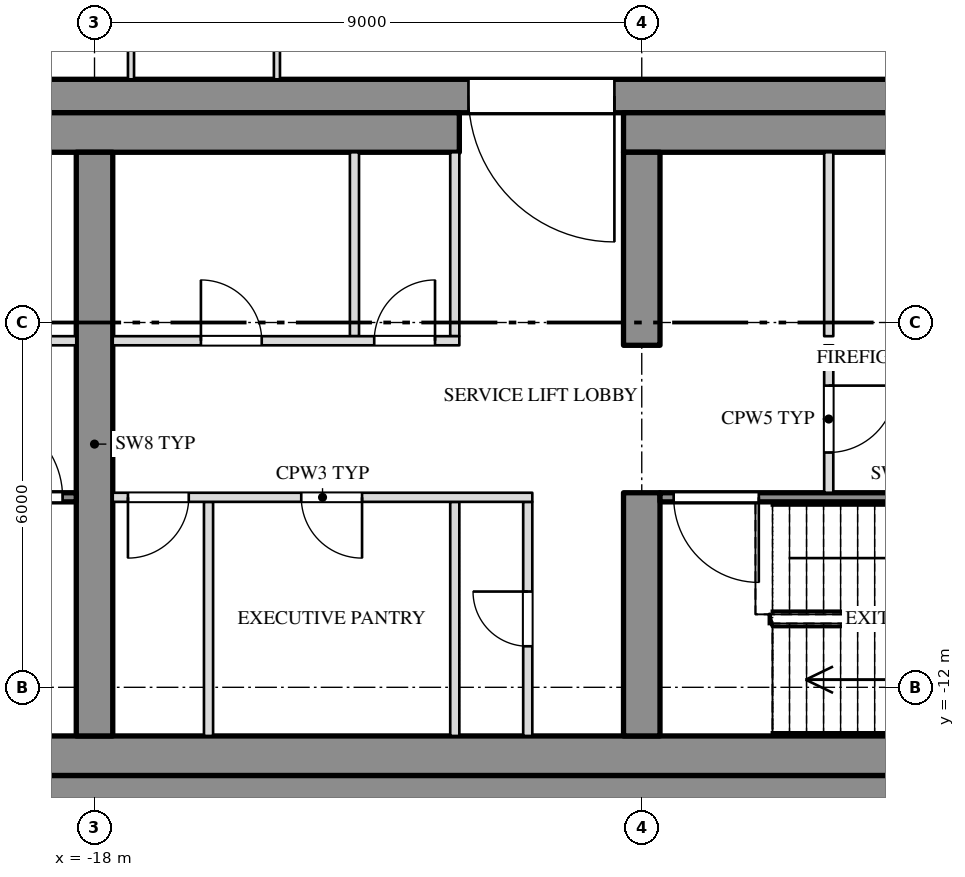
"""IFC4 building model, lengths in metres.
Left out: names, types, materials, properties, quantities, classifications, styles, units other than length and angle.
Written with IfcOpenShell. Run it as: python <this file> out.ifc"""

import sys

from ifc_helpers import new_model, si_unit, direction, frame, frame_2d, origin, place, context, subcontext, project, spatial, rectangle, extrude, element, fill, save


model = new_model("IFC4")
c1 = context("Model", 3, precision=1e-05, world=origin(), true_north=direction((0.0, 1.0)))
c2 = subcontext(c1, "Body", "Model", "MODEL_VIEW")
j1 = project(units=[si_unit("LENGTHUNIT", "METRE"), si_unit("PLANEANGLEUNIT", "RADIAN")], contexts=[c1])
p1 = place(None, origin())
s1 = spatial("IfcSite", under=j1, at=p1, CompositionType="ELEMENT")
p2 = place(p1, origin())
s2 = spatial("IfcBuilding", under=s1, at=p2, CompositionType="ELEMENT")
p3 = place(p2, frame((0.0, 0.0, 280.5)))
s3 = spatial("IfcBuildingStorey", under=s2, at=p3, CompositionType="ELEMENT", Elevation=280.5)
p4 = place(p3, frame((-27.0, -2.275, 0.0), z_axis=(0.0, 0.0, 1.0), x_axis=(1.0, 0.0, 0.0)))
e1 = element("IfcWall", 1, at=p4, inside=s3, PredefinedType="SHEAR", context=c2, shape_type="SweptSolid", body=[
    extrude(rectangle(XDim=54.0, YDim=0.55, at=frame_2d((27.0, 0.0))), origin(), (0.0, 0.0, 1.0), 3.78),
])
p5 = place(p4, frame((15.15, 0.0, 0.0)))
e2 = element("IfcOpeningElement", 2, at=p5, cuts=e1, PredefinedType="OPENING", context=c2, shape_type="SweptSolid", body=[
    extrude(rectangle(XDim=2.4, YDim=2.1, at=frame_2d((1.2, 1.05))), frame((0.0, 0.287, 0.0), z_axis=(0.0, -1.0, 0.0), x_axis=(1.0, 0.0, 0.0)), (0.0, 0.0, 1.0), 0.574),
])
p6 = place(p4, frame((36.45, 0.0, 0.0)))
e3 = element("IfcOpeningElement", 3, at=p6, cuts=e1, PredefinedType="OPENING", context=c2, shape_type="SweptSolid", body=[
    extrude(rectangle(XDim=2.4, YDim=2.1, at=frame_2d((1.2, 1.05))), frame((0.0, 0.287, 0.0), z_axis=(0.0, -1.0, 0.0), x_axis=(1.0, 0.0, 0.0)), (0.0, 0.0, 1.0), 0.574),
])
p7 = place(p3, frame((-27.0, -13.725, 0.0), z_axis=(0.0, 0.0, 1.0), x_axis=(1.0, 0.0, 0.0)))
e4 = element("IfcWall", 4, at=p7, inside=s3, PredefinedType="SHEAR", context=c2, shape_type="SweptSolid", body=[
    extrude(rectangle(XDim=54.0, YDim=0.55, at=frame_2d((27.0, 0.0))), origin(), (0.0, 0.0, 1.0), 3.78),
])
p8 = place(p3, frame((-26.45, -2.875, 0.0), z_axis=(0.0, 0.0, 1.0), x_axis=(1.0, 0.0, 0.0)))
e5 = element("IfcWall", 5, at=p8, inside=s3, PredefinedType="SHEAR", context=c2, shape_type="SweptSolid", body=[
    extrude(rectangle(XDim=14.45, YDim=0.65, at=frame_2d((7.225, 0.0))), origin(), (0.0, 0.0, 1.0), 3.78),
])
p9 = place(p3, frame((-9.3, -2.875, 0.0), z_axis=(0.0, 0.0, 1.0), x_axis=(1.0, 0.0, 0.0)))
e6 = element("IfcWall", 6, at=p9, inside=s3, PredefinedType="SHEAR", context=c2, shape_type="SweptSolid", body=[
    extrude(rectangle(XDim=18.6, YDim=0.65, at=frame_2d((9.3, 0.0))), origin(), (0.0, 0.0, 1.0), 3.78),
])
p10 = place(p3, frame((-26.45, -13.125, 0.0), z_axis=(0.0, 0.0, 1.0), x_axis=(1.0, 0.0, 0.0)))
e7 = element("IfcWall", 7, at=p10, inside=s3, PredefinedType="SHEAR", context=c2, shape_type="SweptSolid", body=[
    extrude(rectangle(XDim=52.9, YDim=0.65, at=frame_2d((26.45, 0.0))), origin(), (0.0, 0.0, 1.0), 3.78),
])
p11 = place(p3, frame((-18.0, -12.8, 0.0), z_axis=(0.0, 0.0, 1.0), x_axis=(0.0, 1.0, 0.0)))
e8 = element("IfcWall", 8, at=p11, inside=s3, PredefinedType="SHEAR", context=c2, shape_type="SweptSolid", body=[
    extrude(rectangle(XDim=9.6, YDim=0.6, at=frame_2d((4.8, 0.0))), origin(), (0.0, 0.0, 1.0), 3.78),
])
p12 = place(p3, frame((-9.0, -12.8, 0.0), z_axis=(0.0, 0.0, 1.0), x_axis=(0.0, 1.0, 0.0)))
e9 = element("IfcWall", 9, at=p12, inside=s3, PredefinedType="SHEAR", context=c2, shape_type="SweptSolid", body=[
    extrude(rectangle(XDim=4.0, YDim=0.6, at=frame_2d((2.0, 0.0))), origin(), (0.0, 0.0, 1.0), 3.78),
])
p13 = place(p3, frame((-9.0, -6.375, 0.0), z_axis=(0.0, 0.0, 1.0), x_axis=(0.0, 1.0, 0.0)))
e10 = element("IfcWall", 10, at=p13, inside=s3, PredefinedType="SHEAR", context=c2, shape_type="SweptSolid", body=[
    extrude(rectangle(XDim=3.175, YDim=0.6, at=frame_2d((1.587, 0.0))), origin(), (0.0, 0.0, 1.0), 3.78),
])
p14 = place(p3, frame((-17.4, -2.0, 0.0), z_axis=(0.0, 0.0, 1.0), x_axis=(0.0, 1.0, 0.0)))
e11 = element("IfcWall", 11, at=p14, inside=s3, PredefinedType="PARTITIONING", context=c2, shape_type="SweptSolid", body=[
    extrude(rectangle(XDim=3.55, YDim=0.1, at=frame_2d((1.775, 0.0))), origin(), (0.0, 0.0, 1.0), 3.78),
])
p15 = place(p3, frame((-15.0, -2.0, 0.0), z_axis=(0.0, 0.0, 1.0), x_axis=(0.0, 1.0, 0.0)))
e12 = element("IfcWall", 12, at=p15, inside=s3, PredefinedType="PARTITIONING", context=c2, shape_type="SweptSolid", body=[
    extrude(rectangle(XDim=38.2, YDim=0.1, at=frame_2d((19.1, 0.0))), origin(), (0.0, 0.0, 1.0), 3.78),
])
p16 = place(p15, frame((13.03, 0.0, 0.0)))
e13 = element("IfcOpeningElement", 13, at=p16, cuts=e12, PredefinedType="OPENING", context=c2, shape_type="SweptSolid", body=[
    extrude(rectangle(XDim=0.9, YDim=2.1, at=frame_2d((0.45, 1.05))), frame((0.0, 0.062, 0.0), z_axis=(0.0, -1.0, 0.0), x_axis=(1.0, 0.0, 0.0)), (0.0, 0.0, 1.0), 0.124),
])
p17 = place(p15, frame((22.77, 0.0, 0.0)))
e14 = element("IfcOpeningElement", 14, at=p17, cuts=e12, PredefinedType="OPENING", context=c2, shape_type="SweptSolid", body=[
    extrude(rectangle(XDim=0.9, YDim=2.1, at=frame_2d((0.45, 1.05))), frame((0.0, 0.062, 0.0), z_axis=(0.0, -1.0, 0.0), x_axis=(1.0, 0.0, 0.0)), (0.0, 0.0, 1.0), 0.124),
])
p18 = place(p15, frame((32.71, 0.0, 0.0)))
e15 = element("IfcOpeningElement", 15, at=p18, cuts=e12, PredefinedType="OPENING", context=c2, shape_type="SweptSolid", body=[
    extrude(rectangle(XDim=0.9, YDim=2.1, at=frame_2d((0.45, 1.05))), frame((0.0, 0.062, 0.0), z_axis=(0.0, -1.0, 0.0), x_axis=(1.0, 0.0, 0.0)), (0.0, 0.0, 1.0), 0.124),
])
for number, where, z_axis, x_axis in (
    (16, (-12.075, -6.225, 0.0), (0.0, 0.0, 1.0), (0.0, 1.0, 0.0)),
    (17, (-13.725, -6.225, 0.0), (0.0, 0.0, 1.0), (0.0, 1.0, 0.0)),
    (18, (-5.925, -6.225, 0.0), (0.0, 0.0, 1.0), (0.0, 1.0, 0.0)),
):
    element("IfcWall", number, at=place(p3, frame(where, z_axis=z_axis, x_axis=x_axis)), inside=s3, PredefinedType="PARTITIONING", context=c2, shape_type="SweptSolid", body=[
        extrude(rectangle(XDim=3.025, YDim=0.15, at=frame_2d((1.513, 0.0))), origin(), (0.0, 0.0, 1.0), 3.78),
    ])
p19 = place(p3, frame((-10.875, -12.8, 0.0), z_axis=(0.0, 0.0, 1.0), x_axis=(0.0, 1.0, 0.0)))
e19 = element("IfcWall", 19, at=p19, inside=s3, PredefinedType="PARTITIONING", context=c2, shape_type="SweptSolid", body=[
    extrude(rectangle(XDim=3.85, YDim=0.15, at=frame_2d((1.925, 0.0))), origin(), (0.0, 0.0, 1.0), 3.78),
])
p20 = place(p19, frame((1.475, 0.0, 0.0)))
e20 = element("IfcOpeningElement", 20, at=p20, cuts=e19, PredefinedType="OPENING", context=c2, shape_type="SweptSolid", body=[
    extrude(rectangle(XDim=0.9, YDim=2.1, at=frame_2d((0.45, 1.05))), frame((0.0, 0.087, 0.0), z_axis=(0.0, -1.0, 0.0), x_axis=(1.0, 0.0, 0.0)), (0.0, 0.0, 1.0), 0.174),
])
for number, where, z_axis, x_axis in (
    (21, (-12.075, -12.8, 0.0), (0.0, 0.0, 1.0), (0.0, 1.0, 0.0)),
    (22, (-16.125, -12.8, 0.0), (0.0, 0.0, 1.0), (0.0, 1.0, 0.0)),
):
    element("IfcWall", number, at=place(p3, frame(where, z_axis=z_axis, x_axis=x_axis)), inside=s3, PredefinedType="PARTITIONING", context=c2, shape_type="SweptSolid", body=[
        extrude(rectangle(XDim=3.85, YDim=0.15, at=frame_2d((1.925, 0.0))), origin(), (0.0, 0.0, 1.0), 3.78),
    ])
p21 = place(p3, frame((-5.925, -8.8, 0.0), z_axis=(0.0, 0.0, 1.0), x_axis=(0.0, 1.0, 0.0)))
e23 = element("IfcWall", 23, at=p21, inside=s3, PredefinedType="PARTITIONING", context=c2, shape_type="SweptSolid", body=[
    extrude(rectangle(XDim=2.425, YDim=0.15, at=frame_2d((1.212, 0.0))), origin(), (0.0, 0.0, 1.0), 3.78),
])
p22 = place(p21, frame((0.662, 0.0, 0.0)))
e24 = element("IfcOpeningElement", 24, at=p22, cuts=e23, PredefinedType="OPENING", context=c2, shape_type="SweptSolid", body=[
    extrude(rectangle(XDim=1.1, YDim=2.1, at=frame_2d((0.55, 1.05))), frame((0.0, 0.087, 0.0), z_axis=(0.0, -1.0, 0.0), x_axis=(1.0, 0.0, 0.0)), (0.0, 0.0, 1.0), 0.174),
])
p23 = place(p3, frame((-23.4, -6.3, 0.0), z_axis=(0.0, 0.0, 1.0), x_axis=(1.0, 0.0, 0.0)))
e25 = element("IfcWall", 25, at=p23, inside=s3, PredefinedType="PARTITIONING", context=c2, shape_type="SweptSolid", body=[
    extrude(rectangle(XDim=5.1, YDim=0.15, at=frame_2d((2.55, 0.0))), origin(), (0.0, 0.0, 1.0), 3.78),
])
p24 = place(p23, frame((0.65, 0.0, 0.0)))
e26 = element("IfcOpeningElement", 26, at=p24, cuts=e25, PredefinedType="OPENING", context=c2, shape_type="SweptSolid", body=[
    extrude(rectangle(XDim=1.4, YDim=2.1, at=frame_2d((0.7, 1.05))), frame((0.0, 0.087, 0.0), z_axis=(0.0, -1.0, 0.0), x_axis=(1.0, 0.0, 0.0)), (0.0, 0.0, 1.0), 0.174),
])
p25 = place(p23, frame((3.35, 0.0, 0.0)))
e27 = element("IfcOpeningElement", 27, at=p25, cuts=e25, PredefinedType="OPENING", context=c2, shape_type="SweptSolid", body=[
    extrude(rectangle(XDim=1.1, YDim=2.1, at=frame_2d((0.55, 1.05))), frame((0.0, 0.087, 0.0), z_axis=(0.0, -1.0, 0.0), x_axis=(1.0, 0.0, 0.0)), (0.0, 0.0, 1.0), 0.174),
])
p26 = place(p3, frame((-17.7, -6.3, 0.0), z_axis=(0.0, 0.0, 1.0), x_axis=(1.0, 0.0, 0.0)))
e28 = element("IfcWall", 28, at=p26, inside=s3, PredefinedType="PARTITIONING", context=c2, shape_type="SweptSolid", body=[
    extrude(rectangle(XDim=5.7, YDim=0.15, at=frame_2d((2.85, 0.0))), origin(), (0.0, 0.0, 1.0), 3.78),
])
p27 = place(p26, frame((1.45, 0.0, 0.0)))
e29 = element("IfcOpeningElement", 29, at=p27, cuts=e28, PredefinedType="OPENING", context=c2, shape_type="SweptSolid", body=[
    extrude(rectangle(XDim=1.0, YDim=2.1, at=frame_2d((0.5, 1.05))), frame((0.0, 0.087, 0.0), z_axis=(0.0, -1.0, 0.0), x_axis=(1.0, 0.0, 0.0)), (0.0, 0.0, 1.0), 0.174),
])
p28 = place(p26, frame((4.3, 0.0, 0.0)))
e30 = element("IfcOpeningElement", 30, at=p28, cuts=e28, PredefinedType="OPENING", context=c2, shape_type="SweptSolid", body=[
    extrude(rectangle(XDim=1.0, YDim=2.1, at=frame_2d((0.5, 1.05))), frame((0.0, 0.087, 0.0), z_axis=(0.0, -1.0, 0.0), x_axis=(1.0, 0.0, 0.0)), (0.0, 0.0, 1.0), 0.174),
])
p29 = place(p3, frame((-25.8, -8.875, 0.0), z_axis=(0.0, 0.0, 1.0), x_axis=(1.0, 0.0, 0.0)))
e31 = element("IfcWall", 31, at=p29, inside=s3, PredefinedType="SHEAR", context=c2, shape_type="SweptSolid", body=[
    extrude(rectangle(XDim=7.5, YDim=0.15, at=frame_2d((3.75, 0.0))), origin(), (0.0, 0.0, 1.0), 3.78),
])
p30 = place(p29, frame((5.875, 0.0, 0.0)))
e32 = element("IfcOpeningElement", 32, at=p30, cuts=e31, PredefinedType="OPENING", context=c2, shape_type="SweptSolid", body=[
    extrude(rectangle(XDim=1.4, YDim=2.1, at=frame_2d((0.7, 1.05))), frame((0.0, 0.087, 0.0), z_axis=(0.0, -1.0, 0.0), x_axis=(1.0, 0.0, 0.0)), (0.0, 0.0, 1.0), 0.174),
])
p31 = place(p3, frame((-17.7, -8.875, 0.0), z_axis=(0.0, 0.0, 1.0), x_axis=(1.0, 0.0, 0.0)))
e33 = element("IfcWall", 33, at=p31, inside=s3, PredefinedType="PARTITIONING", context=c2, shape_type="SweptSolid", body=[
    extrude(rectangle(XDim=6.9, YDim=0.15, at=frame_2d((3.45, 0.0))), origin(), (0.0, 0.0, 1.0), 3.78),
])
p32 = place(p31, frame((0.25, 0.0, 0.0)))
e34 = element("IfcOpeningElement", 34, at=p32, cuts=e33, PredefinedType="OPENING", context=c2, shape_type="SweptSolid", body=[
    extrude(rectangle(XDim=1.0, YDim=2.1, at=frame_2d((0.5, 1.05))), frame((0.0, 0.087, 0.0), z_axis=(0.0, -1.0, 0.0), x_axis=(1.0, 0.0, 0.0)), (0.0, 0.0, 1.0), 0.174),
])
p33 = place(p31, frame((3.1, 0.0, 0.0)))
e35 = element("IfcOpeningElement", 35, at=p33, cuts=e33, PredefinedType="OPENING", context=c2, shape_type="SweptSolid", body=[
    extrude(rectangle(XDim=1.0, YDim=2.1, at=frame_2d((0.5, 1.05))), frame((0.0, 0.087, 0.0), z_axis=(0.0, -1.0, 0.0), x_axis=(1.0, 0.0, 0.0)), (0.0, 0.0, 1.0), 0.174),
])
p34 = place(p3, frame((-8.7, -8.875, 0.0), z_axis=(0.0, 0.0, 1.0), x_axis=(1.0, 0.0, 0.0)))
e36 = element("IfcWall", 36, at=p34, inside=s3, PredefinedType="SHEAR", context=c2, shape_type="SweptSolid", body=[
    extrude(rectangle(XDim=8.4, YDim=0.15, at=frame_2d((4.2, 0.0))), origin(), (0.0, 0.0, 1.0), 3.78),
])
p35 = place(p34, frame((0.225, 0.0, 0.0)))
e37 = element("IfcOpeningElement", 37, at=p35, cuts=e36, PredefinedType="OPENING", context=c2, shape_type="SweptSolid", body=[
    extrude(rectangle(XDim=1.4, YDim=2.1, at=frame_2d((0.7, 1.05))), frame((0.0, 0.087, 0.0), z_axis=(0.0, -1.0, 0.0), x_axis=(1.0, 0.0, 0.0)), (0.0, 0.0, 1.0), 0.174),
])
p36 = place(p30, origin())
e38 = element("IfcDoor", 38, at=p36, inside=s3, OperationType="DOUBLE_DOOR_SINGLE_SWING", PredefinedType="DOOR", context=c2, shape_type="SweptSolid", body=[
    extrude(rectangle(XDim=1.4, YDim=2.1, at=frame_2d((0.7, 1.05))), frame((0.0, 0.025, 0.0), z_axis=(0.0, -1.0, 0.0), x_axis=(1.0, 0.0, 0.0)), (0.0, 0.0, 1.0), 0.05),
])
fill(e32, e38)
p37 = place(p32, origin())
e39 = element("IfcDoor", 39, at=p37, inside=s3, OperationType="SINGLE_SWING_RIGHT", PredefinedType="DOOR", context=c2, shape_type="SweptSolid", body=[
    extrude(rectangle(XDim=1.0, YDim=2.1, at=frame_2d((0.5, 1.05))), frame((0.0, 0.025, 0.0), z_axis=(0.0, -1.0, 0.0), x_axis=(1.0, 0.0, 0.0)), (0.0, 0.0, 1.0), 0.05),
])
fill(e34, e39)
p38 = place(p27, origin())
e40 = element("IfcDoor", 40, at=p38, inside=s3, OperationType="SINGLE_SWING_LEFT", PredefinedType="DOOR", context=c2, shape_type="SweptSolid", body=[
    extrude(rectangle(XDim=1.0, YDim=2.1, at=frame_2d((0.5, 1.05))), frame((0.0, 0.025, 0.0), z_axis=(0.0, -1.0, 0.0), x_axis=(1.0, 0.0, 0.0)), (0.0, 0.0, 1.0), 0.05),
])
fill(e29, e40)
p39 = place(p33, origin())
e41 = element("IfcDoor", 41, at=p39, inside=s3, OperationType="SINGLE_SWING_LEFT", PredefinedType="DOOR", context=c2, shape_type="SweptSolid", body=[
    extrude(rectangle(XDim=1.0, YDim=2.1, at=frame_2d((0.5, 1.05))), frame((0.0, 0.025, 0.0), z_axis=(0.0, -1.0, 0.0), x_axis=(1.0, 0.0, 0.0)), (0.0, 0.0, 1.0), 0.05),
])
fill(e35, e41)
p40 = place(p28, origin())
e42 = element("IfcDoor", 42, at=p40, inside=s3, OperationType="SINGLE_SWING_RIGHT", PredefinedType="DOOR", context=c2, shape_type="SweptSolid", body=[
    extrude(rectangle(XDim=1.0, YDim=2.1, at=frame_2d((0.5, 1.05))), frame((0.0, 0.025, 0.0), z_axis=(0.0, -1.0, 0.0), x_axis=(1.0, 0.0, 0.0)), (0.0, 0.0, 1.0), 0.05),
])
fill(e30, e42)
p41 = place(p20, origin())
e43 = element("IfcDoor", 43, at=p41, inside=s3, OperationType="SINGLE_SWING_RIGHT", PredefinedType="DOOR", context=c2, shape_type="SweptSolid", body=[
    extrude(rectangle(XDim=0.9, YDim=2.1, at=frame_2d((0.45, 1.05))), frame((0.0, 0.025, 0.0), z_axis=(0.0, -1.0, 0.0), x_axis=(1.0, 0.0, 0.0)), (0.0, 0.0, 1.0), 0.05),
])
fill(e20, e43)
p42 = place(p5, origin())
e44 = element("IfcDoor", 44, at=p42, inside=s3, OperationType="DOUBLE_DOOR_SINGLE_SWING", PredefinedType="DOOR", context=c2, shape_type="SweptSolid", body=[
    extrude(rectangle(XDim=2.4, YDim=2.1, at=frame_2d((1.2, 1.05))), frame((0.0, 0.025, 0.0), z_axis=(0.0, -1.0, 0.0), x_axis=(1.0, 0.0, 0.0)), (0.0, 0.0, 1.0), 0.05),
])
fill(e2, e44)
p43 = place(p35, origin())
e45 = element("IfcDoor", 45, at=p43, inside=s3, OperationType="DOUBLE_DOOR_SINGLE_SWING", PredefinedType="DOOR", context=c2, shape_type="SweptSolid", body=[
    extrude(rectangle(XDim=1.4, YDim=2.1, at=frame_2d((0.7, 1.05))), frame((0.0, 0.025, 0.0), z_axis=(0.0, -1.0, 0.0), x_axis=(1.0, 0.0, 0.0)), (0.0, 0.0, 1.0), 0.05),
])
fill(e37, e45)
p44 = place(p22, origin())
e46 = element("IfcDoor", 46, at=p44, inside=s3, OperationType="SINGLE_SWING_LEFT", PredefinedType="DOOR", context=c2, shape_type="SweptSolid", body=[
    extrude(rectangle(XDim=1.1, YDim=2.1, at=frame_2d((0.55, 1.05))), frame((0.0, 0.025, 0.0), z_axis=(0.0, -1.0, 0.0), x_axis=(1.0, 0.0, 0.0)), (0.0, 0.0, 1.0), 0.05),
])
fill(e24, e46)
save(model, sys.argv[1])
